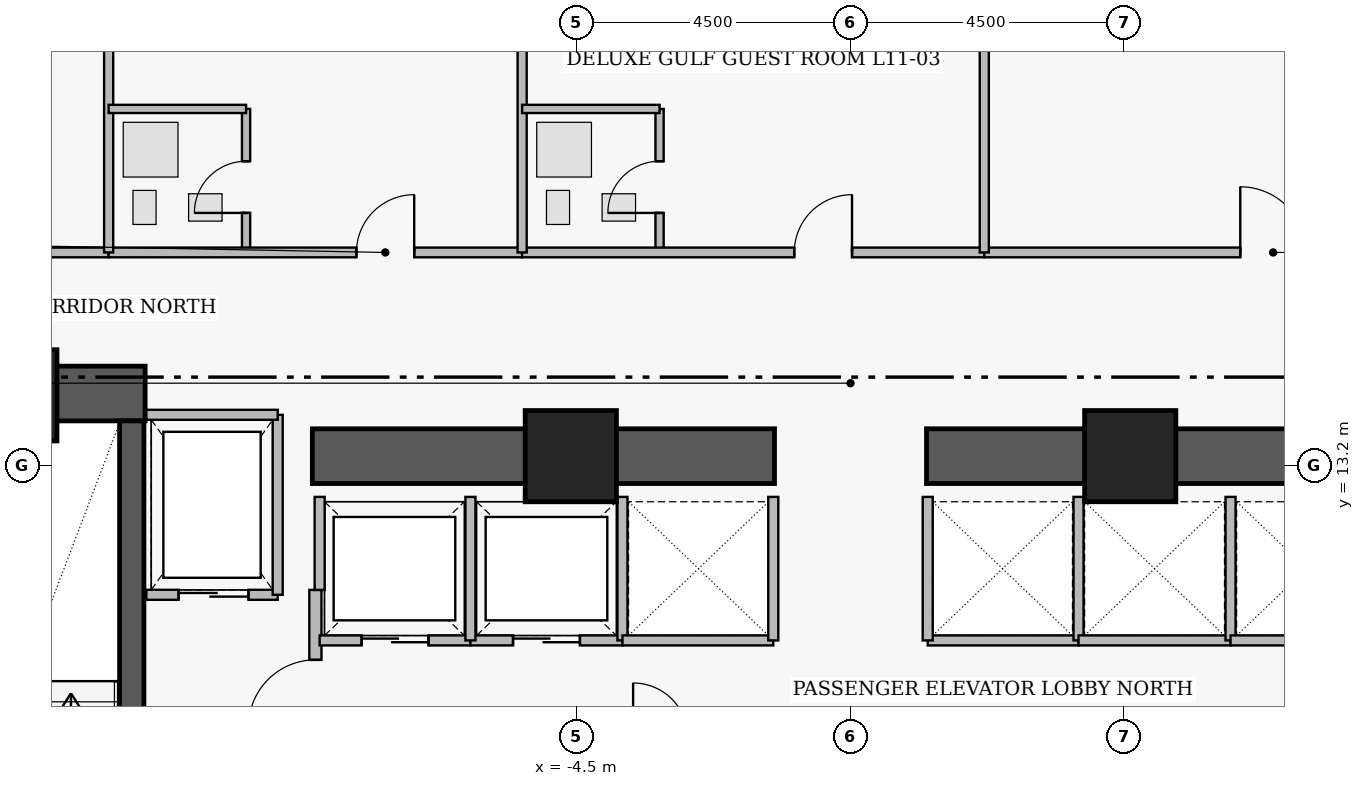
"""IFC4 building model, lengths in metres.
Left out: names, types, materials, properties, quantities, classifications, styles, units other than length and angle.
Written with IfcOpenShell. Run it as: python <this file> out.ifc"""

import sys

from ifc_helpers import new_model, si_unit, direction, frame, frame_2d, origin, origin_2d, place, context, subcontext, project, spatial, rectangle, extrude, element, fill, save


model = new_model("IFC4")
c1 = context("Model", 3, precision=1e-05, world=origin(), true_north=direction((0.0, 1.0)))
c2 = subcontext(c1, "Body", "Model", "MODEL_VIEW")
j1 = project(units=[si_unit("LENGTHUNIT", "METRE"), si_unit("PLANEANGLEUNIT", "RADIAN")], contexts=[c1])
p1 = place(None, origin())
s1 = spatial("IfcSite", under=j1, at=p1, CompositionType="ELEMENT")
p2 = place(p1, origin())
s2 = spatial("IfcBuilding", under=s1, at=p2, CompositionType="ELEMENT")
p3 = place(p2, frame((0.0, 0.0, 49.5)))
s3 = spatial("IfcBuildingStorey", under=s2, at=p3, CompositionType="ELEMENT", Elevation=49.5)
p4 = place(p3, frame((-16.31, 14.38, 0.0), z_axis=(0.0, 0.0, 1.0), x_axis=(1.0, 0.0, 0.0)))
e1 = element("IfcWall", 1, at=p4, inside=s3, PredefinedType="SHEAR", context=c2, shape_type="SweptSolid", body=[
    extrude(rectangle(XDim=4.71, YDim=0.9, at=frame_2d((2.355, 0.0))), origin(), (0.0, 0.0, 1.0), 3.46),
])
for number, where, z_axis, x_axis in (
    (2, (-8.85, 13.35, 0.0), (0.0, 0.0, 1.0), (1.0, 0.0, 0.0)),
    (3, (1.25, 13.35, 0.0), (0.0, 0.0, 1.0), (1.0, 0.0, 0.0)),
):
    element("IfcWall", number, at=place(p3, frame(where, z_axis=z_axis, x_axis=x_axis)), inside=s3, PredefinedType="SHEAR", context=c2, shape_type="SweptSolid", body=[
        extrude(rectangle(XDim=7.6, YDim=0.9, at=frame_2d((3.8, 0.0))), origin(), (0.0, 0.0, 1.0), 3.43),
    ])
p5 = place(p3, frame((-11.82, 4.97, 0.0), z_axis=(0.0, 0.0, 1.0), x_axis=(0.0, 1.0, 0.0)))
e4 = element("IfcWall", 4, at=p5, inside=s3, PredefinedType="SHEAR", context=c2, shape_type="SweptSolid", body=[
    extrude(rectangle(XDim=8.96, YDim=0.4, at=frame_2d((4.48, 0.0))), origin(), (0.0, 0.0, 1.0), 3.46),
])
p6 = place(p5, frame((0.31, 0.0, 0.0)))
e5 = element("IfcOpeningElement", 5, at=p6, cuts=e4, PredefinedType="OPENING", context=c2, shape_type="SweptSolid", body=[
    extrude(rectangle(XDim=1.12, YDim=2.22, at=frame_2d((0.56, 1.11))), frame((0.0, 0.21, 0.0), z_axis=(0.0, -1.0, 0.0), x_axis=(1.0, 0.0, 0.0)), (0.0, 0.0, 1.0), 0.42),
])
for number, where, z_axis, x_axis in (
    (6, (-13.8, 14.35, 0.0), (0.0, 0.0, 1.0), (1.0, 0.0, 0.0)),
    (7, (-4.6, 13.35, 0.0), (0.0, 0.0, 1.0), (1.0, 0.0, 0.0)),
    (8, (4.6, 13.35, 0.0), (0.0, 0.0, 1.0), (1.0, 0.0, 0.0)),
):
    element("IfcColumn", number, at=place(p3, frame(where, z_axis=z_axis, x_axis=x_axis)), inside=s3, PredefinedType="COLUMN", context=c2, shape_type="SweptSolid", body=[
        extrude(rectangle(XDim=1.5, YDim=1.5, at=origin_2d()), origin(), (0.0, 0.0, 1.0), 3.65),
    ])
p7 = place(p3, frame((-8.8, 5.05, 0.0), z_axis=(0.0, 0.0, 1.0), x_axis=(0.0, 1.0, 0.0)))
e9 = element("IfcWall", 9, at=p7, inside=s3, PredefinedType="PARTITIONING", context=c2, shape_type="SweptSolid", body=[
    extrude(rectangle(XDim=6.1, YDim=0.2, at=frame_2d((3.05, 0.0))), origin(), (0.0, 0.0, 1.0), 3.43),
])
p8 = place(p7, frame((0.25, 0.0, 0.0)))
e10 = element("IfcOpeningElement", 10, at=p8, cuts=e9, PredefinedType="OPENING", context=c2, shape_type="SweptSolid", body=[
    extrude(rectangle(XDim=1.1, YDim=2.2, at=frame_2d((0.55, 1.1))), frame((0.0, 0.11, 0.0), z_axis=(0.0, -1.0, 0.0), x_axis=(1.0, 0.0, 0.0)), (0.0, 0.0, 1.0), 0.22),
])
p9 = place(p7, frame((3.85, 0.0, 0.0)))
e11 = element("IfcOpeningElement", 11, at=p9, cuts=e9, PredefinedType="OPENING", context=c2, shape_type="SweptSolid", body=[
    extrude(rectangle(XDim=1.1, YDim=2.2, at=frame_2d((0.55, 1.1))), frame((0.0, 0.11, 0.0), z_axis=(0.0, -1.0, 0.0), x_axis=(1.0, 0.0, 0.0)), (0.0, 0.0, 1.0), 0.22),
])
p10 = place(p3, frame((-11.58, 11.07, 0.0), z_axis=(0.0, 0.0, 1.0), x_axis=(1.0, 0.0, 0.0)))
e12 = element("IfcWall", 12, at=p10, inside=s3, PredefinedType="PARTITIONING", context=c2, shape_type="SweptSolid", body=[
    extrude(rectangle(XDim=2.16, YDim=0.165, at=frame_2d((1.08, 0.0))), origin(), (0.0, 0.0, 1.0), 3.43),
])
p11 = place(p10, frame((0.53, 0.0, 0.0)))
e13 = element("IfcOpeningElement", 13, at=p11, cuts=e12, PredefinedType="OPENING", context=c2, shape_type="SweptSolid", body=[
    extrude(rectangle(XDim=1.15, YDim=2.25, at=frame_2d((0.575, 1.125))), frame((0.0, 0.093, 0.0), z_axis=(0.0, -1.0, 0.0), x_axis=(1.0, 0.0, 0.0)), (0.0, 0.0, 1.0), 0.185),
])
p12 = place(p3, frame((-8.73, 10.32, 0.0), z_axis=(0.0, 0.0, 1.0), x_axis=(1.0, 0.0, 0.0)))
e14 = element("IfcWall", 14, at=p12, inside=s3, PredefinedType="PARTITIONING", context=c2, shape_type="SweptSolid", body=[
    extrude(rectangle(XDim=2.48, YDim=0.165, at=frame_2d((1.24, 0.0))), origin(), (0.0, 0.0, 1.0), 3.43),
])
p13 = place(p12, frame((0.69, 0.0, 0.0)))
e15 = element("IfcOpeningElement", 15, at=p13, cuts=e14, PredefinedType="OPENING", context=c2, shape_type="SweptSolid", body=[
    extrude(rectangle(XDim=1.1, YDim=2.25, at=frame_2d((0.55, 1.125))), frame((0.0, 0.093, 0.0), z_axis=(0.0, -1.0, 0.0), x_axis=(1.0, 0.0, 0.0)), (0.0, 0.0, 1.0), 0.185),
])
p14 = place(p3, frame((-6.25, 10.32, 0.0), z_axis=(0.0, 0.0, 1.0), x_axis=(1.0, 0.0, 0.0)))
e16 = element("IfcWall", 16, at=p14, inside=s3, PredefinedType="PARTITIONING", context=c2, shape_type="SweptSolid", body=[
    extrude(rectangle(XDim=2.5, YDim=0.165, at=frame_2d((1.25, 0.0))), origin(), (0.0, 0.0, 1.0), 3.43),
])
p15 = place(p14, frame((0.7, 0.0, 0.0)))
e17 = element("IfcOpeningElement", 17, at=p15, cuts=e16, PredefinedType="OPENING", context=c2, shape_type="SweptSolid", body=[
    extrude(rectangle(XDim=1.1, YDim=2.25, at=frame_2d((0.55, 1.125))), frame((0.0, 0.093, 0.0), z_axis=(0.0, -1.0, 0.0), x_axis=(1.0, 0.0, 0.0)), (0.0, 0.0, 1.0), 0.185),
])
p16 = place(p3, frame((-25.64, 16.7, 0.0), z_axis=(0.0, 0.0, 1.0), x_axis=(1.0, 0.0, 0.0)))
e18 = element("IfcWall", 18, at=p16, inside=s3, PredefinedType="PARTITIONING", context=c2, shape_type="SweptSolid", body=[
    extrude(rectangle(XDim=13.44, YDim=0.16, at=frame_2d((6.72, 0.0))), origin(), (0.0, 0.0, 1.0), 2.973),
])
p17 = place(p16, frame((7.37, 0.0, 0.0)))
e19 = element("IfcOpeningElement", 19, at=p17, cuts=e18, PredefinedType="OPENING", context=c2, shape_type="SweptSolid", body=[
    extrude(rectangle(XDim=1.0, YDim=2.15, at=frame_2d((0.5, 1.075))), frame((0.0, 0.09, 0.0), z_axis=(0.0, -1.0, 0.0), x_axis=(1.0, 0.0, 0.0)), (0.0, 0.0, 1.0), 0.18),
])
p18 = place(p3, frame((-9.94, 16.7, 0.0), z_axis=(0.0, 0.0, 1.0), x_axis=(0.0, 1.0, 0.0)))
e20 = element("IfcWall", 20, at=p18, inside=s3, PredefinedType="PLUMBINGWALL", context=c2, shape_type="SweptSolid", body=[
    extrude(rectangle(XDim=2.36, YDim=0.135, at=frame_2d((1.18, 0.0))), origin(), (0.0, 0.0, 1.0), 3.43),
])
p19 = place(p18, frame((0.65, 0.0, 0.0)))
e21 = element("IfcOpeningElement", 21, at=p19, cuts=e20, PredefinedType="OPENING", context=c2, shape_type="SweptSolid", body=[
    extrude(rectangle(XDim=0.85, YDim=2.1, at=frame_2d((0.425, 1.05))), frame((0.0, 0.077, 0.0), z_axis=(0.0, -1.0, 0.0), x_axis=(1.0, 0.0, 0.0)), (0.0, 0.0, 1.0), 0.155),
])
p20 = place(p3, frame((-12.2, 16.7, 0.0), z_axis=(0.0, 0.0, 1.0), x_axis=(1.0, 0.0, 0.0)))
e22 = element("IfcWall", 22, at=p20, inside=s3, PredefinedType="PARTITIONING", context=c2, shape_type="SweptSolid", body=[
    extrude(rectangle(XDim=6.8, YDim=0.16, at=frame_2d((3.4, 0.0))), origin(), (0.0, 0.0, 1.0), 2.973),
])
p21 = place(p20, frame((4.075, 0.0, 0.0)))
e23 = element("IfcOpeningElement", 23, at=p21, cuts=e22, PredefinedType="OPENING", context=c2, shape_type="SweptSolid", body=[
    extrude(rectangle(XDim=0.95, YDim=2.15, at=frame_2d((0.475, 1.075))), frame((0.0, 0.09, 0.0), z_axis=(0.0, -1.0, 0.0), x_axis=(1.0, 0.0, 0.0)), (0.0, 0.0, 1.0), 0.18),
])
p22 = place(p3, frame((-3.14, 16.7, 0.0), z_axis=(0.0, 0.0, 1.0), x_axis=(0.0, 1.0, 0.0)))
e24 = element("IfcWall", 24, at=p22, inside=s3, PredefinedType="PLUMBINGWALL", context=c2, shape_type="SweptSolid", body=[
    extrude(rectangle(XDim=2.36, YDim=0.135, at=frame_2d((1.18, 0.0))), origin(), (0.0, 0.0, 1.0), 3.43),
])
p23 = place(p22, frame((0.65, 0.0, 0.0)))
e25 = element("IfcOpeningElement", 25, at=p23, cuts=e24, PredefinedType="OPENING", context=c2, shape_type="SweptSolid", body=[
    extrude(rectangle(XDim=0.85, YDim=2.1, at=frame_2d((0.425, 1.05))), frame((0.0, 0.077, 0.0), z_axis=(0.0, -1.0, 0.0), x_axis=(1.0, 0.0, 0.0)), (0.0, 0.0, 1.0), 0.155),
])
p24 = place(p3, frame((-5.4, 16.7, 0.0), z_axis=(0.0, 0.0, 1.0), x_axis=(1.0, 0.0, 0.0)))
e26 = element("IfcWall", 26, at=p24, inside=s3, PredefinedType="PARTITIONING", context=c2, shape_type="SweptSolid", body=[
    extrude(rectangle(XDim=7.6, YDim=0.16, at=frame_2d((3.8, 0.0))), origin(), (0.0, 0.0, 1.0), 2.973),
])
p25 = place(p24, frame((4.475, 0.0, 0.0)))
e27 = element("IfcOpeningElement", 27, at=p25, cuts=e26, PredefinedType="OPENING", context=c2, shape_type="SweptSolid", body=[
    extrude(rectangle(XDim=0.95, YDim=2.15, at=frame_2d((0.475, 1.075))), frame((0.0, 0.09, 0.0), z_axis=(0.0, -1.0, 0.0), x_axis=(1.0, 0.0, 0.0)), (0.0, 0.0, 1.0), 0.18),
])
p26 = place(p3, frame((2.2, 16.7, 0.0), z_axis=(0.0, 0.0, 1.0), x_axis=(1.0, 0.0, 0.0)))
e28 = element("IfcWall", 28, at=p26, inside=s3, PredefinedType="PARTITIONING", context=c2, shape_type="SweptSolid", body=[
    extrude(rectangle(XDim=7.6, YDim=0.16, at=frame_2d((3.8, 0.0))), origin(), (0.0, 0.0, 1.0), 2.973),
])
p27 = place(p26, frame((4.21, 0.0, 0.0)))
e29 = element("IfcOpeningElement", 29, at=p27, cuts=e28, PredefinedType="OPENING", context=c2, shape_type="SweptSolid", body=[
    extrude(rectangle(XDim=1.08, YDim=2.18, at=frame_2d((0.54, 1.09))), frame((0.0, 0.09, 0.0), z_axis=(0.0, -1.0, 0.0), x_axis=(1.0, 0.0, 0.0)), (0.0, 0.0, 1.0), 0.18),
])
p28 = place(p3, frame((-9.42, 11.07, 0.0), z_axis=(0.0, 0.0, 1.0), x_axis=(0.0, 1.0, 0.0)))
e30 = element("IfcWall", 30, at=p28, inside=s3, PredefinedType="PARTITIONING", context=c2, shape_type="SweptSolid", body=[
    extrude(rectangle(XDim=2.96, YDim=0.165, at=frame_2d((1.48, 0.0))), origin(), (0.0, 0.0, 1.0), 3.43),
])
p29 = place(p3, frame((-11.58, 14.03, 0.0), z_axis=(0.0, 0.0, 1.0), x_axis=(1.0, 0.0, 0.0)))
e31 = element("IfcWall", 31, at=p29, inside=s3, PredefinedType="PARTITIONING", context=c2, shape_type="SweptSolid", body=[
    extrude(rectangle(XDim=2.16, YDim=0.165, at=frame_2d((1.08, 0.0))), origin(), (0.0, 0.0, 1.0), 3.43),
])
p30 = place(p3, frame((-8.73, 11.15, 0.0), z_axis=(0.0, 0.0, 1.0), x_axis=(0.0, 1.0, 0.0)))
e32 = element("IfcWall", 32, at=p30, inside=s3, PredefinedType="PARTITIONING", context=c2, shape_type="SweptSolid", body=[
    extrude(rectangle(XDim=1.53, YDim=0.165, at=frame_2d((0.765, 0.0))), origin(), (0.0, 0.0, 1.0), 3.43),
])
for number, where, z_axis, x_axis in (
    (33, (-6.25, 10.32, 0.0), (0.0, 0.0, 1.0), (0.0, 1.0, 0.0)),
    (34, (-3.75, 10.32, 0.0), (0.0, 0.0, 1.0), (0.0, 1.0, 0.0)),
):
    element("IfcWall", number, at=place(p3, frame(where, z_axis=z_axis, x_axis=x_axis)), inside=s3, PredefinedType="PARTITIONING", context=c2, shape_type="SweptSolid", body=[
        extrude(rectangle(XDim=2.36, YDim=0.165, at=frame_2d((1.18, 0.0))), origin(), (0.0, 0.0, 1.0), 3.43),
    ])
p31 = place(p3, frame((-3.75, 10.32, 0.0), z_axis=(0.0, 0.0, 1.0), x_axis=(1.0, 0.0, 0.0)))
e35 = element("IfcWall", 35, at=p31, inside=s3, PredefinedType="PARTITIONING", context=c2, shape_type="SweptSolid", body=[
    extrude(rectangle(XDim=2.48, YDim=0.165, at=frame_2d((1.24, 0.0))), origin(), (0.0, 0.0, 1.0), 3.43),
])
p32 = place(p3, frame((-1.27, 10.32, 0.0), z_axis=(0.0, 0.0, 1.0), x_axis=(0.0, 1.0, 0.0)))
e36 = element("IfcWall", 36, at=p32, inside=s3, PredefinedType="PARTITIONING", context=c2, shape_type="SweptSolid", body=[
    extrude(rectangle(XDim=2.36, YDim=0.165, at=frame_2d((1.18, 0.0))), origin(), (0.0, 0.0, 1.0), 3.43),
])
p33 = place(p3, frame((1.27, 10.32, 0.0), z_axis=(0.0, 0.0, 1.0), x_axis=(1.0, 0.0, 0.0)))
e37 = element("IfcWall", 37, at=p33, inside=s3, PredefinedType="PARTITIONING", context=c2, shape_type="SweptSolid", body=[
    extrude(rectangle(XDim=2.48, YDim=0.165, at=frame_2d((1.24, 0.0))), origin(), (0.0, 0.0, 1.0), 3.43),
])
for number, where, z_axis, x_axis in (
    (38, (1.27, 10.32, 0.0), (0.0, 0.0, 1.0), (0.0, 1.0, 0.0)),
    (39, (3.75, 10.32, 0.0), (0.0, 0.0, 1.0), (0.0, 1.0, 0.0)),
):
    element("IfcWall", number, at=place(p3, frame(where, z_axis=z_axis, x_axis=x_axis)), inside=s3, PredefinedType="PARTITIONING", context=c2, shape_type="SweptSolid", body=[
        extrude(rectangle(XDim=2.36, YDim=0.165, at=frame_2d((1.18, 0.0))), origin(), (0.0, 0.0, 1.0), 3.43),
    ])
p34 = place(p3, frame((3.75, 10.32, 0.0), z_axis=(0.0, 0.0, 1.0), x_axis=(1.0, 0.0, 0.0)))
e40 = element("IfcWall", 40, at=p34, inside=s3, PredefinedType="PARTITIONING", context=c2, shape_type="SweptSolid", body=[
    extrude(rectangle(XDim=2.5, YDim=0.165, at=frame_2d((1.25, 0.0))), origin(), (0.0, 0.0, 1.0), 3.43),
])
p35 = place(p3, frame((6.25, 10.32, 0.0), z_axis=(0.0, 0.0, 1.0), x_axis=(0.0, 1.0, 0.0)))
e41 = element("IfcWall", 41, at=p35, inside=s3, PredefinedType="PARTITIONING", context=c2, shape_type="SweptSolid", body=[
    extrude(rectangle(XDim=2.36, YDim=0.165, at=frame_2d((1.18, 0.0))), origin(), (0.0, 0.0, 1.0), 3.43),
])
p36 = place(p3, frame((6.25, 10.32, 0.0), z_axis=(0.0, 0.0, 1.0), x_axis=(1.0, 0.0, 0.0)))
e42 = element("IfcWall", 42, at=p36, inside=s3, PredefinedType="PARTITIONING", context=c2, shape_type="SweptSolid", body=[
    extrude(rectangle(XDim=2.48, YDim=0.165, at=frame_2d((1.24, 0.0))), origin(), (0.0, 0.0, 1.0), 3.43),
])
p37 = place(p3, frame((-12.2, 16.7, 0.0), z_axis=(0.0, 0.0, 1.0), x_axis=(0.0, 1.0, 0.0)))
e43 = element("IfcWall", 43, at=p37, inside=s3, PredefinedType="PARTITIONING", context=c2, shape_type="SweptSolid", body=[
    extrude(rectangle(XDim=6.32, YDim=0.15, at=frame_2d((3.16, 0.0))), origin(), (0.0, 0.0, 1.0), 3.43),
])
p38 = place(p3, frame((-12.2, 19.06, 0.0), z_axis=(0.0, 0.0, 1.0), x_axis=(1.0, 0.0, 0.0)))
e44 = element("IfcWall", 44, at=p38, inside=s3, PredefinedType="PLUMBINGWALL", context=c2, shape_type="SweptSolid", body=[
    extrude(rectangle(XDim=2.26, YDim=0.135, at=frame_2d((1.13, 0.0))), origin(), (0.0, 0.0, 1.0), 2.973),
])
p39 = place(p3, frame((-5.4, 16.7, 0.0), z_axis=(0.0, 0.0, 1.0), x_axis=(0.0, 1.0, 0.0)))
e45 = element("IfcWall", 45, at=p39, inside=s3, PredefinedType="PARTITIONING", context=c2, shape_type="SweptSolid", body=[
    extrude(rectangle(XDim=6.32, YDim=0.15, at=frame_2d((3.16, 0.0))), origin(), (0.0, 0.0, 1.0), 3.43),
])
p40 = place(p3, frame((-5.4, 19.06, 0.0), z_axis=(0.0, 0.0, 1.0), x_axis=(1.0, 0.0, 0.0)))
e46 = element("IfcWall", 46, at=p40, inside=s3, PredefinedType="PLUMBINGWALL", context=c2, shape_type="SweptSolid", body=[
    extrude(rectangle(XDim=2.26, YDim=0.135, at=frame_2d((1.13, 0.0))), origin(), (0.0, 0.0, 1.0), 2.973),
])
p41 = place(p3, frame((2.2, 16.7, 0.0), z_axis=(0.0, 0.0, 1.0), x_axis=(0.0, 1.0, 0.0)))
e47 = element("IfcWall", 47, at=p41, inside=s3, PredefinedType="PARTITIONING", context=c2, shape_type="SweptSolid", body=[
    extrude(rectangle(XDim=6.32, YDim=0.15, at=frame_2d((3.16, 0.0))), origin(), (0.0, 0.0, 1.0), 3.43),
])
p42 = place(p9, origin())
e48 = element("IfcDoor", 48, at=p42, inside=s3, OperationType="SINGLE_SWING_LEFT", PredefinedType="DOOR", context=c2, shape_type="SweptSolid", body=[
    extrude(rectangle(XDim=1.1, YDim=2.2, at=frame_2d((0.55, 1.1))), frame((0.0, 0.025, 0.0), z_axis=(0.0, -1.0, 0.0), x_axis=(1.0, 0.0, 0.0)), (0.0, 0.0, 1.0), 0.05),
])
fill(e11, e48)
p43 = place(p11, origin())
e49 = element("IfcDoor", 49, at=p43, inside=s3, OperationType="SLIDING_TO_LEFT", PredefinedType="DOOR", context=c2, shape_type="SweptSolid", body=[
    extrude(rectangle(XDim=1.15, YDim=2.25, at=frame_2d((0.575, 1.125))), frame((0.0, 0.025, 0.0), z_axis=(0.0, -1.0, 0.0), x_axis=(1.0, 0.0, 0.0)), (0.0, 0.0, 1.0), 0.05),
])
fill(e13, e49)
p44 = place(p13, origin())
e50 = element("IfcDoor", 50, at=p44, inside=s3, OperationType="SLIDING_TO_LEFT", PredefinedType="DOOR", context=c2, shape_type="SweptSolid", body=[
    extrude(rectangle(XDim=1.1, YDim=2.25, at=frame_2d((0.55, 1.125))), frame((0.0, 0.025, 0.0), z_axis=(0.0, -1.0, 0.0), x_axis=(1.0, 0.0, 0.0)), (0.0, 0.0, 1.0), 0.05),
])
fill(e15, e50)
p45 = place(p15, origin())
e51 = element("IfcDoor", 51, at=p45, inside=s3, OperationType="SLIDING_TO_LEFT", PredefinedType="DOOR", context=c2, shape_type="SweptSolid", body=[
    extrude(rectangle(XDim=1.1, YDim=2.25, at=frame_2d((0.55, 1.125))), frame((0.0, 0.025, 0.0), z_axis=(0.0, -1.0, 0.0), x_axis=(1.0, 0.0, 0.0)), (0.0, 0.0, 1.0), 0.05),
])
fill(e17, e51)
p46 = place(p19, origin())
e52 = element("IfcDoor", 52, at=p46, inside=s3, OperationType="SINGLE_SWING_LEFT", PredefinedType="DOOR", context=c2, shape_type="SweptSolid", body=[
    extrude(rectangle(XDim=0.85, YDim=2.1, at=frame_2d((0.425, 1.05))), frame((0.0, 0.025, 0.0), z_axis=(0.0, -1.0, 0.0), x_axis=(1.0, 0.0, 0.0)), (0.0, 0.0, 1.0), 0.05),
])
fill(e21, e52)
p47 = place(p21, origin())
e53 = element("IfcDoor", 53, at=p47, inside=s3, OperationType="SINGLE_SWING_RIGHT", PredefinedType="DOOR", context=c2, shape_type="SweptSolid", body=[
    extrude(rectangle(XDim=0.95, YDim=2.15, at=frame_2d((0.475, 1.075))), frame((0.0, 0.025, 0.0), z_axis=(0.0, -1.0, 0.0), x_axis=(1.0, 0.0, 0.0)), (0.0, 0.0, 1.0), 0.05),
])
fill(e23, e53)
p48 = place(p23, origin())
e54 = element("IfcDoor", 54, at=p48, inside=s3, OperationType="SINGLE_SWING_LEFT", PredefinedType="DOOR", context=c2, shape_type="SweptSolid", body=[
    extrude(rectangle(XDim=0.85, YDim=2.1, at=frame_2d((0.425, 1.05))), frame((0.0, 0.025, 0.0), z_axis=(0.0, -1.0, 0.0), x_axis=(1.0, 0.0, 0.0)), (0.0, 0.0, 1.0), 0.05),
])
fill(e25, e54)
p49 = place(p25, origin())
e55 = element("IfcDoor", 55, at=p49, inside=s3, OperationType="SINGLE_SWING_RIGHT", PredefinedType="DOOR", context=c2, shape_type="SweptSolid", body=[
    extrude(rectangle(XDim=0.95, YDim=2.15, at=frame_2d((0.475, 1.075))), frame((0.0, 0.025, 0.0), z_axis=(0.0, -1.0, 0.0), x_axis=(1.0, 0.0, 0.0)), (0.0, 0.0, 1.0), 0.05),
])
fill(e27, e55)
p50 = place(p27, origin())
e56 = element("IfcDoor", 56, at=p50, inside=s3, OperationType="SINGLE_SWING_LEFT", PredefinedType="DOOR", context=c2, shape_type="SweptSolid", body=[
    extrude(rectangle(XDim=1.08, YDim=2.18, at=frame_2d((0.54, 1.09))), frame((0.0, 0.025, 0.0), z_axis=(0.0, -1.0, 0.0), x_axis=(1.0, 0.0, 0.0)), (0.0, 0.0, 1.0), 0.05),
])
fill(e29, e56)
save(model, sys.argv[1])
